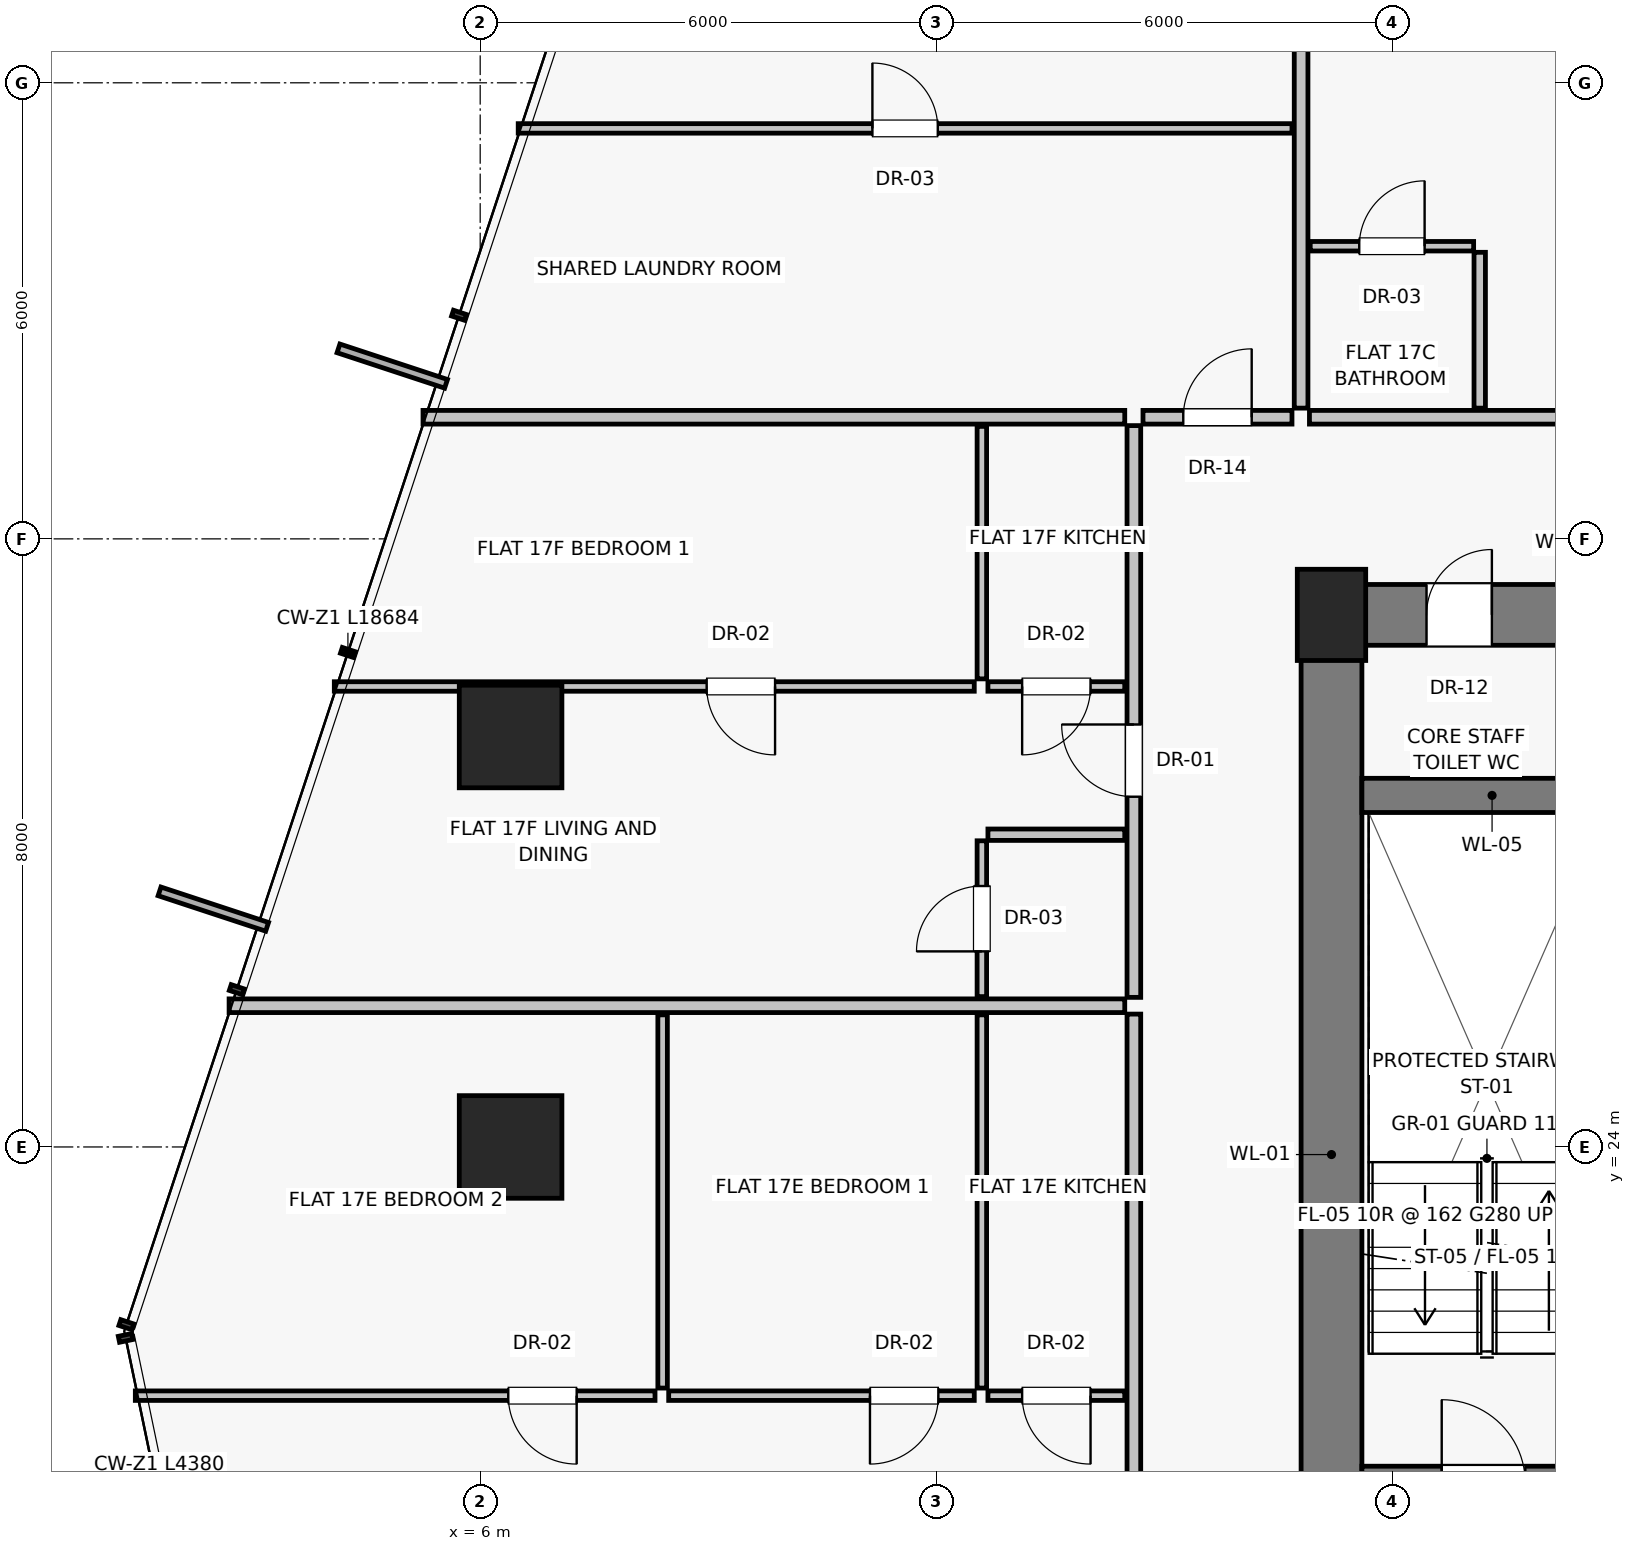
"""IFC4 building model, lengths in metres.
Left out: names, types, materials, properties, quantities, classifications, styles, units other than length and angle.
Written with IfcOpenShell. Run it as: python <this file> out.ifc"""

import sys

from ifc_helpers import new_model, si_unit, direction, frame, frame_2d, origin, origin_2d, place, context, subcontext, project, spatial, rectangle, extrude, source, transform, mapped, element, fill, save


model = new_model("IFC4")
c1 = context("Model", 3, precision=1e-05, world=origin(), true_north=direction((0.0, 1.0)))
c2 = subcontext(c1, "Body", "Model", "MODEL_VIEW")
j1 = project(units=[si_unit("LENGTHUNIT", "METRE"), si_unit("PLANEANGLEUNIT", "RADIAN")], contexts=[c1])
p1 = place(None, origin())
s1 = spatial("IfcSite", under=j1, at=p1, CompositionType="ELEMENT")
p2 = place(p1, origin())
s2 = spatial("IfcBuilding", under=s1, at=p2, CompositionType="ELEMENT")
p3 = place(p2, frame((0.0, 0.0, 64.1)))
s3 = spatial("IfcBuildingStorey", under=s2, at=p3, CompositionType="ELEMENT", Elevation=64.1)
p4 = place(p3, frame((17.2, 31.0, 0.0), z_axis=(0.0, 0.0, 1.0), x_axis=(1.0, 0.0, 0.0)))
e1 = element("IfcColumn", 1, at=p4, inside=s3, PredefinedType="PILASTER", context=c2, shape_type="SweptSolid", body=[
    extrude(rectangle(XDim=0.9, YDim=1.2, at=origin_2d()), origin(), (0.0, 0.0, 1.0), 3.25),
])
for number, where, z_axis, x_axis in (
    (2, (6.4, 29.4, 0.0), (0.0, 0.0, 1.0), (1.0, 0.0, 0.0)),
    (3, (6.4, 24.0, 0.0), (0.0, 0.0, 1.0), (1.0, 0.0, 0.0)),
):
    element("IfcColumn", number, at=place(p3, frame(where, z_axis=z_axis, x_axis=x_axis)), inside=s3, PredefinedType="COLUMN", context=c2, shape_type="SweptSolid", body=[
        extrude(rectangle(XDim=1.35, YDim=1.35, at=origin_2d()), origin(), (0.0, 0.0, 1.0), 3.25),
    ])
p5 = place(p3, frame((17.2, 16.8, 0.0), z_axis=(0.0, 0.0, 1.0), x_axis=(0.0, 1.0, 0.0)))
e4 = element("IfcWall", 4, at=p5, inside=s3, PredefinedType="SHEAR", context=c2, shape_type="SweptSolid", body=[
    extrude(rectangle(XDim=14.2, YDim=0.8, at=frame_2d((7.1, 0.0))), origin(), (0.0, 0.0, 1.0), 3.0),
])
p6 = place(p3, frame((17.2, 31.0, 0.0), z_axis=(0.0, 0.0, 1.0), x_axis=(1.0, 0.0, 0.0)))
e5 = element("IfcWall", 5, at=p6, inside=s3, PredefinedType="SHEAR", context=c2, shape_type="SweptSolid", body=[
    extrude(rectangle(XDim=3.8, YDim=0.8, at=frame_2d((1.9, 0.0))), origin(), (0.0, 0.0, 1.0), 3.0),
])
p7 = place(p6, frame((1.25, 0.0, 0.0)))
e6 = element("IfcOpeningElement", 6, at=p7, cuts=e5, PredefinedType="OPENING", context=c2, shape_type="SweptSolid", body=[
    extrude(rectangle(XDim=0.86, YDim=2.01, at=frame_2d((0.43, 1.005))), frame((0.0, 0.41, 0.0), z_axis=(0.0, -1.0, 0.0), x_axis=(1.0, 0.0, 0.0)), (0.0, 0.0, 1.0), 0.82),
])
p8 = place(p3, frame((17.6, 19.575, 0.0), z_axis=(0.0, 0.0, 1.0), x_axis=(1.0, 0.0, 0.0)))
e7 = element("IfcWall", 7, at=p8, inside=s3, PredefinedType="SHEAR", context=c2, shape_type="SweptSolid", body=[
    extrude(rectangle(XDim=3.425, YDim=0.45, at=frame_2d((1.712, 0.0))), origin(), (0.0, 0.0, 1.0), 3.0),
])
p9 = place(p8, frame((1.05, 0.0, 0.0)))
e8 = element("IfcOpeningElement", 8, at=p9, cuts=e7, PredefinedType="OPENING", context=c2, shape_type="SweptSolid", body=[
    extrude(rectangle(XDim=1.1, YDim=2.03, at=frame_2d((0.55, 1.015))), frame((0.0, 0.235, 0.0), z_axis=(0.0, -1.0, 0.0), x_axis=(1.0, 0.0, 0.0)), (0.0, 0.0, 1.0), 0.47),
])
p10 = place(p3, frame((17.6, 28.625, 0.0), z_axis=(0.0, 0.0, 1.0), x_axis=(1.0, 0.0, 0.0)))
e9 = element("IfcWall", 9, at=p10, inside=s3, PredefinedType="SHEAR", context=c2, shape_type="SweptSolid", body=[
    extrude(rectangle(XDim=3.425, YDim=0.45, at=frame_2d((1.712, 0.0))), origin(), (0.0, 0.0, 1.0), 3.0),
])
p11 = place(p3, frame((16.8, 33.72, 0.0), z_axis=(0.0, 0.0, 1.0), x_axis=(0.0, 1.0, 0.0)))
e10 = element("IfcWall", 10, at=p11, inside=s3, PredefinedType="PARTITIONING", context=c2, shape_type="SweptSolid", body=[
    extrude(rectangle(XDim=10.042, YDim=0.18, at=frame_2d((5.021, 0.0))), origin(), (0.0, 0.0, 1.0), 3.0),
])
p12 = place(p3, frame((16.91, 33.6, 0.0), z_axis=(0.0, 0.0, 1.0), x_axis=(1.0, 0.0, 0.0)))
e11 = element("IfcWall", 11, at=p12, inside=s3, PredefinedType="PARTITIONING", context=c2, shape_type="SweptSolid", body=[
    extrude(rectangle(XDim=5.638, YDim=0.18, at=frame_2d((2.819, 0.0))), origin(), (0.0, 0.0, 1.0), 3.0),
])
p13 = place(p12, frame((3.373, 0.0, 0.0)))
e12 = element("IfcOpeningElement", 12, at=p13, cuts=e11, PredefinedType="OPENING", context=c2, shape_type="SweptSolid", body=[
    extrude(rectangle(XDim=0.95, YDim=2.02, at=frame_2d((0.475, 1.01))), frame((0.0, 0.1, 0.0), z_axis=(0.0, -1.0, 0.0), x_axis=(1.0, 0.0, 0.0)), (0.0, 0.0, 1.0), 0.2),
])
p14 = place(p3, frame((19.15, 33.72, 0.0), z_axis=(0.0, 0.0, 1.0), x_axis=(0.0, 1.0, 0.0)))
e13 = element("IfcWall", 13, at=p14, inside=s3, PredefinedType="PARTITIONING", context=c2, shape_type="SweptSolid", body=[
    extrude(rectangle(XDim=2.05, YDim=0.15, at=frame_2d((1.025, 0.0))), origin(), (0.0, 0.0, 1.0), 3.0),
])
p15 = place(p3, frame((16.92, 35.85, 0.0), z_axis=(0.0, 0.0, 1.0), x_axis=(1.0, 0.0, 0.0)))
e14 = element("IfcWall", 14, at=p15, inside=s3, PredefinedType="PARTITIONING", context=c2, shape_type="SweptSolid", body=[
    extrude(rectangle(XDim=2.15, YDim=0.125, at=frame_2d((1.075, 0.0))), origin(), (0.0, 0.0, 1.0), 3.0),
])
p16 = place(p15, frame((0.645, 0.0, 0.0)))
e15 = element("IfcOpeningElement", 15, at=p16, cuts=e14, PredefinedType="OPENING", context=c2, shape_type="SweptSolid", body=[
    extrude(rectangle(XDim=0.86, YDim=2.01, at=frame_2d((0.43, 1.005))), frame((0.0, 0.073, 0.0), z_axis=(0.0, -1.0, 0.0), x_axis=(1.0, 0.0, 0.0)), (0.0, 0.0, 1.0), 0.145),
])
p17 = place(p3, frame((14.48, 33.6, 0.0), z_axis=(0.0, 0.0, 1.0), x_axis=(-1.0, 0.0, 0.0)))
e16 = element("IfcWall", 16, at=p17, inside=s3, PredefinedType="PARTITIONING", context=c2, shape_type="SweptSolid", body=[
    extrude(rectangle(XDim=9.232, YDim=0.18, at=frame_2d((4.616, 0.0))), origin(), (0.0, 0.0, 1.0), 3.0),
])
p18 = place(p3, frame((14.6, 14.31, 0.0), z_axis=(0.0, 0.0, 1.0), x_axis=(0.0, 1.0, 0.0)))
e17 = element("IfcWall", 17, at=p18, inside=s3, PredefinedType="PARTITIONING", context=c2, shape_type="SweptSolid", body=[
    extrude(rectangle(XDim=11.438, YDim=0.18, at=frame_2d((5.719, 0.0))), origin(), (0.0, 0.0, 1.0), 3.0),
])
p19 = place(p18, frame((3.804, 0.0, 0.0)))
e18 = element("IfcOpeningElement", 18, at=p19, cuts=e17, PredefinedType="OPENING", context=c2, shape_type="SweptSolid", body=[
    extrude(rectangle(XDim=0.95, YDim=2.02, at=frame_2d((0.475, 1.01))), frame((0.0, 0.1, 0.0), z_axis=(0.0, -1.0, 0.0), x_axis=(1.0, 0.0, 0.0)), (0.0, 0.0, 1.0), 0.2),
])
p20 = place(p3, frame((14.48, 20.728, 0.0), z_axis=(0.0, 0.0, 1.0), x_axis=(-1.0, 0.0, 0.0)))
e19 = element("IfcWall", 19, at=p20, inside=s3, PredefinedType="PARTITIONING", context=c2, shape_type="SweptSolid", body=[
    extrude(rectangle(XDim=1.8, YDim=0.125, at=frame_2d((0.9, 0.0))), origin(), (0.0, 0.0, 1.0), 3.0),
])
p21 = place(p20, frame((0.45, 0.0, 0.0)))
e20 = element("IfcOpeningElement", 20, at=p21, cuts=e19, PredefinedType="OPENING", context=c2, shape_type="SweptSolid", body=[
    extrude(rectangle(XDim=0.9, YDim=2.01, at=frame_2d((0.45, 1.005))), frame((0.0, 0.073, 0.0), z_axis=(0.0, -1.0, 0.0), x_axis=(1.0, 0.0, 0.0)), (0.0, 0.0, 1.0), 0.145),
])
for number, where, z_axis, x_axis in (
    (21, (12.6, 20.828, 0.0), (0.0, 0.0, 1.0), (0.0, 1.0, 0.0)),
    (22, (8.4, 20.828, 0.0), (0.0, 0.0, 1.0), (0.0, 1.0, 0.0)),
):
    element("IfcWall", number, at=place(p3, frame(where, z_axis=z_axis, x_axis=x_axis)), inside=s3, PredefinedType="PARTITIONING", context=c2, shape_type="SweptSolid", body=[
        extrude(rectangle(XDim=4.91, YDim=0.125, at=frame_2d((2.455, 0.0))), origin(), (0.0, 0.0, 1.0), 3.0),
    ])
p22 = place(p3, frame((12.5, 20.728, 0.0), z_axis=(0.0, 0.0, 1.0), x_axis=(-1.0, 0.0, 0.0)))
e23 = element("IfcWall", 23, at=p22, inside=s3, PredefinedType="PARTITIONING", context=c2, shape_type="SweptSolid", body=[
    extrude(rectangle(XDim=4.02, YDim=0.125, at=frame_2d((2.01, 0.0))), origin(), (0.0, 0.0, 1.0), 3.0),
])
p23 = place(p22, frame((0.472, 0.0, 0.0)))
e24 = element("IfcOpeningElement", 24, at=p23, cuts=e23, PredefinedType="OPENING", context=c2, shape_type="SweptSolid", body=[
    extrude(rectangle(XDim=0.9, YDim=2.01, at=frame_2d((0.45, 1.005))), frame((0.0, 0.073, 0.0), z_axis=(0.0, -1.0, 0.0), x_axis=(1.0, 0.0, 0.0)), (0.0, 0.0, 1.0), 0.145),
])
p24 = place(p3, frame((8.3, 20.728, 0.0), z_axis=(0.0, 0.0, 1.0), x_axis=(-1.0, 0.0, 0.0)))
e25 = element("IfcWall", 25, at=p24, inside=s3, PredefinedType="PARTITIONING", context=c2, shape_type="SweptSolid", body=[
    extrude(rectangle(XDim=6.837, YDim=0.125, at=frame_2d((3.418, 0.0))), origin(), (0.0, 0.0, 1.0), 3.0),
])
p25 = place(p24, frame((1.031, 0.0, 0.0)))
e26 = element("IfcOpeningElement", 26, at=p25, cuts=e25, PredefinedType="OPENING", context=c2, shape_type="SweptSolid", body=[
    extrude(rectangle(XDim=0.9, YDim=2.01, at=frame_2d((0.45, 1.005))), frame((0.0, 0.073, 0.0), z_axis=(0.0, -1.0, 0.0), x_axis=(1.0, 0.0, 0.0)), (0.0, 0.0, 1.0), 0.145),
])
p26 = place(p3, frame((14.48, 25.858, 0.0), z_axis=(0.0, 0.0, 1.0), x_axis=(-1.0, 0.0, 0.0)))
e27 = element("IfcWall", 27, at=p26, inside=s3, PredefinedType="PARTITIONING", context=c2, shape_type="SweptSolid", body=[
    extrude(rectangle(XDim=11.783, YDim=0.18, at=frame_2d((5.892, 0.0))), origin(), (0.0, 0.0, 1.0), 3.0),
])
p27 = place(p3, frame((14.6, 25.968, 0.0), z_axis=(0.0, 0.0, 1.0), x_axis=(0.0, 1.0, 0.0)))
e28 = element("IfcWall", 28, at=p27, inside=s3, PredefinedType="PARTITIONING", context=c2, shape_type="SweptSolid", body=[
    extrude(rectangle(XDim=7.522, YDim=0.18, at=frame_2d((3.761, 0.0))), origin(), (0.0, 0.0, 1.0), 3.0),
])
p28 = place(p27, frame((2.64, 0.0, 0.0)))
e29 = element("IfcOpeningElement", 29, at=p28, cuts=e28, PredefinedType="OPENING", context=c2, shape_type="SweptSolid", body=[
    extrude(rectangle(XDim=0.95, YDim=2.02, at=frame_2d((0.475, 1.01))), frame((0.0, 0.1, 0.0), z_axis=(0.0, -1.0, 0.0), x_axis=(1.0, 0.0, 0.0)), (0.0, 0.0, 1.0), 0.2),
])
p29 = place(p3, frame((14.48, 28.108, 0.0), z_axis=(0.0, 0.0, 1.0), x_axis=(-1.0, 0.0, 0.0)))
e30 = element("IfcWall", 30, at=p29, inside=s3, PredefinedType="PARTITIONING", context=c2, shape_type="SweptSolid", body=[
    extrude(rectangle(XDim=1.8, YDim=0.15, at=frame_2d((0.9, 0.0))), origin(), (0.0, 0.0, 1.0), 3.0),
])
p30 = place(p3, frame((12.6, 25.978, 0.0), z_axis=(0.0, 0.0, 1.0), x_axis=(0.0, 1.0, 0.0)))
e31 = element("IfcWall", 31, at=p30, inside=s3, PredefinedType="PARTITIONING", context=c2, shape_type="SweptSolid", body=[
    extrude(rectangle(XDim=2.05, YDim=0.125, at=frame_2d((1.025, 0.0))), origin(), (0.0, 0.0, 1.0), 3.0),
])
p31 = place(p30, frame((0.595, 0.0, 0.0)))
e32 = element("IfcOpeningElement", 32, at=p31, cuts=e31, PredefinedType="OPENING", context=c2, shape_type="SweptSolid", body=[
    extrude(rectangle(XDim=0.86, YDim=2.01, at=frame_2d((0.43, 1.005))), frame((0.0, 0.073, 0.0), z_axis=(0.0, -1.0, 0.0), x_axis=(1.0, 0.0, 0.0)), (0.0, 0.0, 1.0), 0.145),
])
p32 = place(p3, frame((14.48, 30.058, 0.0), z_axis=(0.0, 0.0, 1.0), x_axis=(-1.0, 0.0, 0.0)))
e33 = element("IfcWall", 33, at=p32, inside=s3, PredefinedType="PARTITIONING", context=c2, shape_type="SweptSolid", body=[
    extrude(rectangle(XDim=1.8, YDim=0.125, at=frame_2d((0.9, 0.0))), origin(), (0.0, 0.0, 1.0), 2.299),
])
p33 = place(p32, frame((0.45, 0.0, 0.0)))
e34 = element("IfcOpeningElement", 34, at=p33, cuts=e33, PredefinedType="OPENING", context=c2, shape_type="SweptSolid", body=[
    extrude(rectangle(XDim=0.9, YDim=2.01, at=frame_2d((0.45, 1.005))), frame((0.0, 0.073, 0.0), z_axis=(0.0, -1.0, 0.0), x_axis=(1.0, 0.0, 0.0)), (0.0, 0.0, 1.0), 0.145),
])
p34 = place(p3, frame((12.6, 30.158, 0.0), z_axis=(0.0, 0.0, 1.0), x_axis=(0.0, 1.0, 0.0)))
e35 = element("IfcWall", 35, at=p34, inside=s3, PredefinedType="PARTITIONING", context=c2, shape_type="SweptSolid", body=[
    extrude(rectangle(XDim=3.322, YDim=0.125, at=frame_2d((1.661, 0.0))), origin(), (0.0, 0.0, 1.0), 3.0),
])
p35 = place(p3, frame((12.5, 30.058, 0.0), z_axis=(0.0, 0.0, 1.0), x_axis=(-1.0, 0.0, 0.0)))
e36 = element("IfcWall", 36, at=p35, inside=s3, PredefinedType="PARTITIONING", context=c2, shape_type="SweptSolid", body=[
    extrude(rectangle(XDim=8.419, YDim=0.125, at=frame_2d((4.209, 0.0))), origin(), (0.0, 0.0, 1.0), 2.299),
])
p36 = place(p35, frame((2.621, 0.0, 0.0)))
e37 = element("IfcOpeningElement", 37, at=p36, cuts=e36, PredefinedType="OPENING", context=c2, shape_type="SweptSolid", body=[
    extrude(rectangle(XDim=0.9, YDim=2.01, at=frame_2d((0.45, 1.005))), frame((0.0, 0.073, 0.0), z_axis=(0.0, -1.0, 0.0), x_axis=(1.0, 0.0, 0.0)), (0.0, 0.0, 1.0), 0.145),
])
p37 = place(p3, frame((14.72, 33.6, 0.0), z_axis=(0.0, 0.0, 1.0), x_axis=(1.0, 0.0, 0.0)))
e38 = element("IfcWall", 38, at=p37, inside=s3, PredefinedType="PARTITIONING", context=c2, shape_type="SweptSolid", body=[
    extrude(rectangle(XDim=1.96, YDim=0.18, at=frame_2d((0.98, 0.0))), origin(), (0.0, 0.0, 1.0), 3.0),
])
p38 = place(p37, frame((0.53, 0.0, 0.0)))
e39 = element("IfcOpeningElement", 39, at=p38, cuts=e38, PredefinedType="OPENING", context=c2, shape_type="SweptSolid", body=[
    extrude(rectangle(XDim=0.9, YDim=2.01, at=frame_2d((0.45, 1.005))), frame((0.0, 0.1, 0.0), z_axis=(0.0, -1.0, 0.0), x_axis=(1.0, 0.0, 0.0)), (0.0, 0.0, 1.0), 0.2),
])
p39 = place(p3, frame((6.5, 37.4, 0.0), z_axis=(0.0, 0.0, 1.0), x_axis=(1.0, 0.0, 0.0)))
e40 = element("IfcWall", 40, at=p39, inside=s3, PredefinedType="PARTITIONING", context=c2, shape_type="SweptSolid", body=[
    extrude(rectangle(XDim=10.18, YDim=0.125, at=frame_2d((5.09, 0.0))), origin(), (0.0, 0.0, 1.0), 3.0),
])
p40 = place(p39, frame((4.66, 0.0, 0.0)))
e41 = element("IfcOpeningElement", 41, at=p40, cuts=e40, PredefinedType="OPENING", context=c2, shape_type="SweptSolid", body=[
    extrude(rectangle(XDim=0.86, YDim=2.01, at=frame_2d((0.43, 1.005))), frame((0.0, 0.073, 0.0), z_axis=(0.0, -1.0, 0.0), x_axis=(1.0, 0.0, 0.0)), (0.0, 0.0, 1.0), 0.145),
])
m1 = source(origin(), c2, "Body", "SweptSolid", [
    extrude(rectangle(XDim=0.86, YDim=2.01, at=frame_2d((0.43, 1.005))), frame((0.0, 0.025, 0.0), z_axis=(0.0, -1.0, 0.0), x_axis=(1.0, 0.0, 0.0)), (0.0, 0.0, 1.0), 0.05),
])
p41 = place(p7, origin())
e42 = element("IfcDoor", 42, at=p41, inside=s3, OperationType="SINGLE_SWING_RIGHT", PredefinedType="DOOR", context=c2, shape_type="MappedRepresentation", body=[
    mapped(m1, transform((0.0, 0.0, 0.0), scale=1.0)),
])
fill(e6, e42)
p42 = place(p16, origin())
e43 = element("IfcDoor", 43, at=p42, inside=s3, OperationType="SINGLE_SWING_RIGHT", PredefinedType="DOOR", context=c2, shape_type="MappedRepresentation", body=[
    mapped(m1, transform((0.0, 0.0, 0.0), scale=1.0)),
])
fill(e15, e43)
m2 = source(origin(), c2, "Body", "SweptSolid", [
    extrude(rectangle(XDim=0.9, YDim=2.01, at=frame_2d((0.45, 1.005))), frame((0.0, 0.025, 0.0), z_axis=(0.0, -1.0, 0.0), x_axis=(1.0, 0.0, 0.0)), (0.0, 0.0, 1.0), 0.05),
])
p43 = place(p21, origin())
e44 = element("IfcDoor", 44, at=p43, inside=s3, OperationType="SINGLE_SWING_LEFT", PredefinedType="DOOR", context=c2, shape_type="MappedRepresentation", body=[
    mapped(m2, transform((0.0, 0.0, 0.0), scale=1.0)),
])
fill(e20, e44)
p44 = place(p23, origin())
e45 = element("IfcDoor", 45, at=p44, inside=s3, OperationType="SINGLE_SWING_RIGHT", PredefinedType="DOOR", context=c2, shape_type="MappedRepresentation", body=[
    mapped(m2, transform((0.0, 0.0, 0.0), scale=1.0)),
])
fill(e24, e45)
p45 = place(p25, origin())
e46 = element("IfcDoor", 46, at=p45, inside=s3, OperationType="SINGLE_SWING_LEFT", PredefinedType="DOOR", context=c2, shape_type="MappedRepresentation", body=[
    mapped(m2, transform((0.0, 0.0, 0.0), scale=1.0)),
])
fill(e26, e46)
m3 = source(origin(), c2, "Body", "SweptSolid", [
    extrude(rectangle(XDim=0.95, YDim=2.02, at=frame_2d((0.475, 1.01))), frame((0.0, 0.025, 0.0), z_axis=(0.0, -1.0, 0.0), x_axis=(1.0, 0.0, 0.0)), (0.0, 0.0, 1.0), 0.05),
])
p46 = place(p28, origin())
e47 = element("IfcDoor", 47, at=p46, inside=s3, OperationType="SINGLE_SWING_RIGHT", PredefinedType="DOOR", context=c2, shape_type="MappedRepresentation", body=[
    mapped(m3, transform((0.0, 0.0, 0.0), scale=1.0)),
])
fill(e29, e47)
p47 = place(p31, origin())
e48 = element("IfcDoor", 48, at=p47, inside=s3, OperationType="SINGLE_SWING_LEFT", PredefinedType="DOOR", context=c2, shape_type="MappedRepresentation", body=[
    mapped(m1, transform((0.0, 0.0, 0.0), scale=1.0)),
])
fill(e32, e48)
p48 = place(p33, origin())
e49 = element("IfcDoor", 49, at=p48, inside=s3, OperationType="SINGLE_SWING_RIGHT", PredefinedType="DOOR", context=c2, shape_type="MappedRepresentation", body=[
    mapped(m2, transform((0.0, 0.0, 0.0), scale=1.0)),
])
fill(e34, e49)
p49 = place(p36, origin())
e50 = element("IfcDoor", 50, at=p49, inside=s3, OperationType="SINGLE_SWING_LEFT", PredefinedType="DOOR", context=c2, shape_type="MappedRepresentation", body=[
    mapped(m2, transform((0.0, 0.0, 0.0), scale=1.0)),
])
fill(e37, e50)
p50 = place(p38, origin())
e51 = element("IfcDoor", 51, at=p50, inside=s3, OperationType="SINGLE_SWING_RIGHT", PredefinedType="DOOR", context=c2, shape_type="MappedRepresentation", body=[
    mapped(m2, transform((0.0, 0.0, 0.0), scale=1.0)),
])
fill(e39, e51)
p51 = place(p40, origin())
e52 = element("IfcDoor", 52, at=p51, inside=s3, OperationType="SINGLE_SWING_LEFT", PredefinedType="DOOR", context=c2, shape_type="MappedRepresentation", body=[
    mapped(m1, transform((0.0, 0.0, 0.0), scale=1.0)),
])
fill(e41, e52)
save(model, sys.argv[1])
